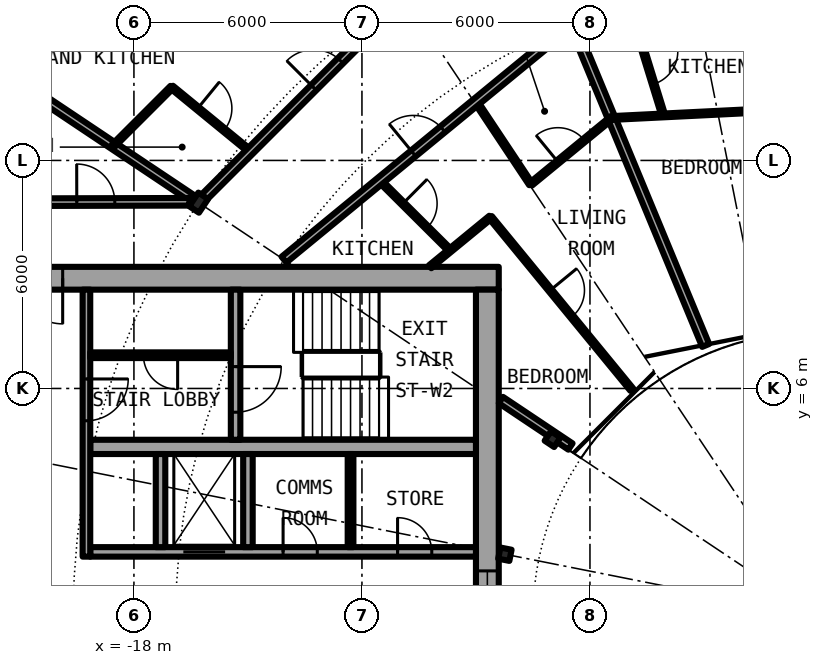
"""IFC4 building model, lengths in metres.
Left out: names, types, materials, properties, quantities, classifications, styles, units other than length and angle.
Written with IfcOpenShell. Run it as: python <this file> out.ifc"""

import sys

from ifc_helpers import new_model, si_unit, direction, frame, frame_2d, origin, origin_2d, place, context, subcontext, project, spatial, rectangle, i_section, extrude, element, fill, save


model = new_model("IFC4")
c1 = context("Model", 3, precision=1e-05, world=origin(), true_north=direction((0.0, 1.0)))
c2 = subcontext(c1, "Body", "Model", "MODEL_VIEW")
j1 = project(units=[si_unit("LENGTHUNIT", "METRE"), si_unit("PLANEANGLEUNIT", "RADIAN")], contexts=[c1])
p1 = place(None, origin())
s1 = spatial("IfcSite", under=j1, at=p1, CompositionType="ELEMENT")
p2 = place(p1, origin())
s2 = spatial("IfcBuilding", under=s1, at=p2, CompositionType="ELEMENT")
p3 = place(p2, frame((0.0, 0.0, 111.65)))
s3 = spatial("IfcBuildingStorey", under=s2, at=p3, CompositionType="ELEMENT", Elevation=111.65)
p4 = place(p3, frame((-16.297, 10.889, 0.0), z_axis=(0.0, 0.0, 1.0), x_axis=(-0.831469612303, 0.55557023302, 0.0)))
e1 = element("IfcColumn", 1, at=p4, inside=s3, PredefinedType="COLUMN", context=c2, shape_type="SweptSolid", body=[
    extrude(i_section(OverallWidth=0.307, OverallDepth=0.432, WebThickness=0.021, FlangeThickness=0.04, FilletRadius=0.027, at=origin_2d()), origin(), (0.0, 0.0, 1.0), 3.05),
])
for number, where, z_axis, x_axis in (
    (2, (-6.984, 4.667, 0.0), (0.0, 0.0, 1.0), (-0.831, 0.556, 0.0)),
    (3, (-8.239, 1.639, 0.0), (0.0, 0.0, 1.0), (-0.981, 0.195, 0.0)),
):
    element("IfcColumn", number, at=place(p3, frame(where, z_axis=z_axis, x_axis=x_axis)), inside=s3, PredefinedType="COLUMN", context=c2, shape_type="SweptSolid", body=[
        extrude(i_section(OverallWidth=0.3, OverallDepth=0.3, WebThickness=0.011, FlangeThickness=0.019, FilletRadius=0.027, at=origin_2d()), origin(), (0.0, 0.0, 1.0), 3.05),
    ])
p5 = place(p3, frame((-8.4, 8.9, 0.0), z_axis=(0.0, 0.0, 1.0), x_axis=(-1.0, 0.0, 0.0)))
e4 = element("IfcWall", 4, at=p5, inside=s3, PredefinedType="SHEAR", context=c2, shape_type="SweptSolid", body=[
    extrude(rectangle(XDim=13.8, YDim=0.6, at=frame_2d((6.9, 0.0))), origin(), (0.0, 0.0, 1.0), 3.05),
])
p6 = place(p5, frame((11.475, 0.0, 0.0)))
e5 = element("IfcOpeningElement", 5, at=p6, cuts=e4, PredefinedType="OPENING", context=c2, shape_type="SweptSolid", body=[
    extrude(rectangle(XDim=1.2, YDim=2.3, at=frame_2d((0.6, 1.15))), frame((0.0, 0.31, 0.0), z_axis=(0.0, -1.0, 0.0), x_axis=(1.0, 0.0, 0.0)), (0.0, 0.0, 1.0), 0.62),
])
p7 = place(p3, frame((-8.7, 8.6, 0.0), z_axis=(0.0, 0.0, 1.0), x_axis=(0.0, -1.0, 0.0)))
e6 = element("IfcWall", 6, at=p7, inside=s3, PredefinedType="SHEAR", context=c2, shape_type="SweptSolid", body=[
    extrude(rectangle(XDim=17.2, YDim=0.6, at=frame_2d((8.6, 0.0))), origin(), (0.0, 0.0, 1.0), 3.05),
])
p8 = place(p7, frame((7.4, 0.0, 0.1)))
e7 = element("IfcOpeningElement", 7, at=p8, cuts=e6, PredefinedType="OPENING", context=c2, shape_type="SweptSolid", body=[
    extrude(rectangle(XDim=2.4, YDim=2.2, at=frame_2d((1.2, 1.1))), frame((0.0, 0.31, 0.0), z_axis=(0.0, -1.0, 0.0), x_axis=(1.0, 0.0, 0.0)), (0.0, 0.0, 1.0), 0.62),
])
p9 = place(p3, frame((-19.15, 1.7, 0.0), z_axis=(0.0, 0.0, 1.0), x_axis=(1.0, 0.0, 0.0)))
e8 = element("IfcWall", 8, at=p9, inside=s3, PredefinedType="SHEAR", context=c2, shape_type="SweptSolid", body=[
    extrude(rectangle(XDim=10.15, YDim=0.25, at=frame_2d((5.075, 0.0))), origin(), (0.0, 0.0, 1.0), 3.05),
])
p10 = place(p9, frame((2.45, 0.0, 0.0)))
e9 = element("IfcOpeningElement", 9, at=p10, cuts=e8, PredefinedType="OPENING", context=c2, shape_type="SweptSolid", body=[
    extrude(rectangle(XDim=1.1, YDim=2.3, at=frame_2d((0.55, 1.15))), frame((0.0, 0.135, 0.0), z_axis=(0.0, -1.0, 0.0), x_axis=(1.0, 0.0, 0.0)), (0.0, 0.0, 1.0), 0.27),
])
p11 = place(p9, frame((8.087, 0.0, 0.0)))
e10 = element("IfcOpeningElement", 10, at=p11, cuts=e8, PredefinedType="OPENING", context=c2, shape_type="SweptSolid", body=[
    extrude(rectangle(XDim=0.9, YDim=2.3, at=frame_2d((0.45, 1.15))), frame((0.0, 0.135, 0.0), z_axis=(0.0, -1.0, 0.0), x_axis=(1.0, 0.0, 0.0)), (0.0, 0.0, 1.0), 0.27),
])
p12 = place(p9, frame((5.075, 0.0, 0.0)))
e11 = element("IfcOpeningElement", 11, at=p12, cuts=e8, PredefinedType="OPENING", context=c2, shape_type="SweptSolid", body=[
    extrude(rectangle(XDim=0.9, YDim=2.3, at=frame_2d((0.45, 1.15))), frame((0.0, 0.135, 0.0), z_axis=(0.0, -1.0, 0.0), x_axis=(1.0, 0.0, 0.0)), (0.0, 0.0, 1.0), 0.27),
])
p13 = place(p3, frame((-9.0, 4.462, 0.0), z_axis=(0.0, 0.0, 1.0), x_axis=(-1.0, 0.0, 0.0)))
e12 = element("IfcWall", 12, at=p13, inside=s3, PredefinedType="SHEAR", context=c2, shape_type="SweptSolid", body=[
    extrude(rectangle(XDim=10.15, YDim=0.375, at=frame_2d((5.075, 0.0))), origin(), (0.0, 0.0, 1.0), 3.05),
])
p14 = place(p3, frame((-15.325, 8.6, 0.0), z_axis=(0.0, 0.0, 1.0), x_axis=(0.0, -1.0, 0.0)))
e13 = element("IfcWall", 13, at=p14, inside=s3, PredefinedType="SHEAR", context=c2, shape_type="SweptSolid", body=[
    extrude(rectangle(XDim=3.95, YDim=0.25, at=frame_2d((1.975, 0.0))), origin(), (0.0, 0.0, 1.0), 3.05),
])
p15 = place(p14, frame((2.025, 0.0, 0.0)))
e14 = element("IfcOpeningElement", 14, at=p15, cuts=e13, PredefinedType="OPENING", context=c2, shape_type="SweptSolid", body=[
    extrude(rectangle(XDim=1.2, YDim=2.3, at=frame_2d((0.6, 1.15))), frame((0.0, 0.135, 0.0), z_axis=(0.0, -1.0, 0.0), x_axis=(1.0, 0.0, 0.0)), (0.0, 0.0, 1.0), 0.27),
])
for number, where, z_axis, x_axis in (
    (15, (-15.0, 1.825, 0.0), (0.0, 0.0, 1.0), (0.0, 1.0, 0.0)),
    (16, (-17.3, 1.825, 0.0), (0.0, 0.0, 1.0), (0.0, 1.0, 0.0)),
):
    element("IfcWall", number, at=place(p3, frame(where, z_axis=z_axis, x_axis=x_axis)), inside=s3, PredefinedType="SOLIDWALL", context=c2, shape_type="SweptSolid", body=[
        extrude(rectangle(XDim=2.45, YDim=0.25, at=frame_2d((1.225, 0.0))), origin(), (0.0, 0.0, 1.0), 2.7),
    ])
p16 = place(p3, frame((-19.25, 8.6, 0.0), z_axis=(0.0, 0.0, 1.0), x_axis=(0.0, -1.0, 0.0)))
e17 = element("IfcWall", 17, at=p16, inside=s3, PredefinedType="SOLIDWALL", context=c2, shape_type="SweptSolid", body=[
    extrude(rectangle(XDim=7.025, YDim=0.2, at=frame_2d((3.513, 0.0))), origin(), (0.0, 0.0, 1.0), 2.7),
])
p17 = place(p16, frame((2.35, 0.0, 0.0)))
e18 = element("IfcOpeningElement", 18, at=p17, cuts=e17, PredefinedType="OPENING", context=c2, shape_type="SweptSolid", body=[
    extrude(rectangle(XDim=1.1, YDim=2.3, at=frame_2d((0.55, 1.15))), frame((0.0, 0.11, 0.0), z_axis=(0.0, -1.0, 0.0), x_axis=(1.0, 0.0, 0.0)), (0.0, 0.0, 1.0), 0.22),
])
p18 = place(p3, frame((-12.3, 1.825, 0.0), z_axis=(0.0, 0.0, 1.0), x_axis=(0.0, 1.0, 0.0)))
e19 = element("IfcWall", 19, at=p18, inside=s3, PredefinedType="PARTITIONING", context=c2, shape_type="SweptSolid", body=[
    extrude(rectangle(XDim=2.45, YDim=0.15, at=frame_2d((1.225, 0.0))), origin(), (0.0, 0.0, 1.0), 2.7),
])
p19 = place(p3, frame((-15.45, 6.875, 0.0), z_axis=(0.0, 0.0, 1.0), x_axis=(-1.0, 0.0, 0.0)))
e20 = element("IfcWall", 20, at=p19, inside=s3, PredefinedType="PARTITIONING", context=c2, shape_type="SweptSolid", body=[
    extrude(rectangle(XDim=3.7, YDim=0.15, at=frame_2d((1.85, 0.0))), origin(), (0.0, 0.0, 1.0), 2.7),
])
p20 = place(p19, frame((1.4, 0.0, 0.0)))
e21 = element("IfcOpeningElement", 21, at=p20, cuts=e20, PredefinedType="OPENING", context=c2, shape_type="SweptSolid", body=[
    extrude(rectangle(XDim=0.9, YDim=2.3, at=frame_2d((0.45, 1.15))), frame((0.0, 0.085, 0.0), z_axis=(0.0, -1.0, 0.0), x_axis=(1.0, 0.0, 0.0)), (0.0, 0.0, 1.0), 0.17),
])
p21 = place(p3, frame((-22.595, 15.098, 0.0), z_axis=(0.0, 0.0, 1.0), x_axis=(0.831406593008, -0.555664536482, 0.0)))
e22 = element("IfcWall", 22, at=p21, inside=s3, PredefinedType="PARTITIONING", context=c2, shape_type="SweptSolid", body=[
    extrude(rectangle(XDim=7.358, YDim=0.2, at=frame_2d((3.679, 0.0))), origin(), (0.0, 0.0, 1.0), 2.7),
])
p22 = place(p3, frame((-17.004, 13.927, 0.0), z_axis=(0.0, 0.0, 1.0), x_axis=(0.77367517848, -0.633582447834, 0.0)))
e23 = element("IfcWall", 23, at=p22, inside=s3, PredefinedType="PARTITIONING", context=c2, shape_type="SweptSolid", body=[
    extrude(rectangle(XDim=2.661, YDim=0.1, at=frame_2d((1.331, 0.0))), origin(), (0.0, 0.0, 1.0), 2.7),
])
p23 = place(p22, frame((0.881, 0.0, 0.0)))
e24 = element("IfcOpeningElement", 24, at=p23, cuts=e23, PredefinedType="OPENING", context=c2, shape_type="SweptSolid", body=[
    extrude(rectangle(XDim=0.9, YDim=2.3, at=frame_2d((0.45, 1.15))), frame((0.0, 0.06, 0.0), z_axis=(0.0, -1.0, 0.0), x_axis=(1.0, 0.0, 0.0)), (0.0, 0.0, 1.0), 0.12),
])
p24 = place(p3, frame((-11.524, 11.464, 0.0), z_axis=(0.0, 0.0, 1.0), x_axis=(0.708796844581, -0.705412668665, 0.0)))
e25 = element("IfcWall", 25, at=p24, inside=s3, PredefinedType="PARTITIONING", context=c2, shape_type="SweptSolid", body=[
    extrude(rectangle(XDim=2.597, YDim=0.1, at=frame_2d((1.299, 0.0))), origin(), (0.0, 0.0, 1.0), 2.7),
])
p25 = place(p24, frame((0.849, 0.0, 0.0)))
e26 = element("IfcOpeningElement", 26, at=p25, cuts=e25, PredefinedType="OPENING", context=c2, shape_type="SweptSolid", body=[
    extrude(rectangle(XDim=0.9, YDim=2.3, at=frame_2d((0.45, 1.15))), frame((0.0, 0.06, 0.0), z_axis=(0.0, -1.0, 0.0), x_axis=(1.0, 0.0, 0.0)), (0.0, 0.0, 1.0), 0.12),
])
p26 = place(p3, frame((-8.996, 13.539, 0.0), z_axis=(0.0, 0.0, 1.0), x_axis=(0.553615197403, -0.83277260594, 0.0)))
e27 = element("IfcWall", 27, at=p26, inside=s3, PredefinedType="PARTITIONING", context=c2, shape_type="SweptSolid", body=[
    extrude(rectangle(XDim=2.597, YDim=0.1, at=frame_2d((1.299, 0.0))), origin(), (0.0, 0.0, 1.0), 2.7),
])
p27 = place(p3, frame((-8.62, 10.504, 0.0), z_axis=(0.0, 0.0, 1.0), x_axis=(0.634358693064, -0.773038840249, 0.0)))
e28 = element("IfcWall", 28, at=p27, inside=s3, PredefinedType="PARTITIONING", context=c2, shape_type="SweptSolid", body=[
    extrude(rectangle(XDim=5.868, YDim=0.1, at=frame_2d((2.934, 0.0))), origin(), (0.0, 0.0, 1.0), 2.7),
])
p28 = place(p27, frame((2.484, 0.0, 0.0)))
e29 = element("IfcOpeningElement", 29, at=p28, cuts=e28, PredefinedType="OPENING", context=c2, shape_type="SweptSolid", body=[
    extrude(rectangle(XDim=0.9, YDim=2.3, at=frame_2d((0.45, 1.15))), frame((0.0, 0.06, 0.0), z_axis=(0.0, -1.0, 0.0), x_axis=(1.0, 0.0, 0.0)), (0.0, 0.0, 1.0), 0.12),
])
p29 = place(p3, frame((-6.468, 15.614, 0.0), z_axis=(0.0, 0.0, 1.0), x_axis=(0.382646942224, -0.923894646378, 0.0)))
e30 = element("IfcWall", 30, at=p29, inside=s3, PredefinedType="PARTITIONING", context=c2, shape_type="SweptSolid", body=[
    extrude(rectangle(XDim=9.181, YDim=0.2, at=frame_2d((4.59, 0.0))), origin(), (0.0, 0.0, 1.0), 2.7),
])
p30 = place(p3, frame((-4.843, 15.693, 0.0), z_axis=(0.0, 0.0, 1.0), x_axis=(0.294961884541, -0.955509019669, 0.0)))
e31 = element("IfcWall", 31, at=p30, inside=s3, PredefinedType="PARTITIONING", context=c2, shape_type="SweptSolid", body=[
    extrude(rectangle(XDim=2.624, YDim=0.1, at=frame_2d((1.312, 0.0))), origin(), (0.0, 0.0, 1.0), 2.7),
])
p31 = place(p30, frame((0.862, 0.0, 0.0)))
e32 = element("IfcOpeningElement", 32, at=p31, cuts=e31, PredefinedType="OPENING", context=c2, shape_type="SweptSolid", body=[
    extrude(rectangle(XDim=0.9, YDim=2.3, at=frame_2d((0.45, 1.15))), frame((0.0, 0.06, 0.0), z_axis=(0.0, -1.0, 0.0), x_axis=(1.0, 0.0, 0.0)), (0.0, 0.0, 1.0), 0.12),
])
p32 = place(p3, frame((-6.513, 4.472, 0.0), z_axis=(0.0, 0.0, 1.0), x_axis=(-0.831333375071, 0.555774072347, 0.0)))
e33 = element("IfcWall", 33, at=p32, inside=s3, PredefinedType="PARTITIONING", context=c2, shape_type="SweptSolid", body=[
    extrude(rectangle(XDim=2.203, YDim=0.2, at=frame_2d((1.101, 0.0))), origin(), (0.0, 0.0, 1.0), 2.7),
])
p33 = place(p3, frame((-21.675, 10.9, 0.0), z_axis=(0.0, 0.0, 1.0), x_axis=(0.999997173357, 0.002377662213, 0.0)))
e34 = element("IfcWall", 34, at=p33, inside=s3, PredefinedType="PARTITIONING", context=c2, shape_type="SweptSolid", body=[
    extrude(rectangle(XDim=5.134, YDim=0.2, at=frame_2d((2.567, 0.0))), origin(), (0.0, 0.0, 1.0), 2.7),
])
p34 = place(p33, frame((2.171, 0.0, 0.0)))
e35 = element("IfcOpeningElement", 35, at=p34, cuts=e34, PredefinedType="OPENING", context=c2, shape_type="SweptSolid", body=[
    extrude(rectangle(XDim=1.0, YDim=2.3, at=frame_2d((0.5, 1.15))), frame((0.0, 0.11, 0.0), z_axis=(0.0, -1.0, 0.0), x_axis=(1.0, 0.0, 0.0)), (0.0, 0.0, 1.0), 0.22),
])
p35 = place(p3, frame((-5.439, 13.116, 0.0), z_axis=(0.0, 0.0, 1.0), x_axis=(0.998772010578, 0.049542616872, 0.0)))
e36 = element("IfcWall", 36, at=p35, inside=s3, PredefinedType="PARTITIONING", context=c2, shape_type="SweptSolid", body=[
    extrude(rectangle(XDim=4.1, YDim=0.1, at=frame_2d((2.05, 0.0))), origin(), (0.0, 0.0, 1.0), 2.7),
])
p36 = place(p3, frame((-10.207, 9.202, 0.0), z_axis=(0.0, 0.0, 1.0), x_axis=(0.772998703631, 0.634407600983, 0.0)))
e37 = element("IfcWall", 37, at=p36, inside=s3, PredefinedType="PARTITIONING", context=c2, shape_type="SweptSolid", body=[
    extrude(rectangle(XDim=2.056, YDim=0.1, at=frame_2d((1.028, 0.0))), origin(), (0.0, 0.0, 1.0), 2.7),
])
p37 = place(p3, frame((-7.556, 11.377, 0.0), z_axis=(0.0, 0.0, 1.0), x_axis=(0.773149312811, 0.634224045665, 0.0)))
e38 = element("IfcWall", 38, at=p37, inside=s3, PredefinedType="PARTITIONING", context=c2, shape_type="SweptSolid", body=[
    extrude(rectangle(XDim=2.749, YDim=0.1, at=frame_2d((1.374, 0.0))), origin(), (0.0, 0.0, 1.0), 2.7),
])
p38 = place(p37, frame((0.922, 0.0, 0.0)))
e39 = element("IfcOpeningElement", 39, at=p38, cuts=e38, PredefinedType="OPENING", context=c2, shape_type="SweptSolid", body=[
    extrude(rectangle(XDim=0.9, YDim=2.3, at=frame_2d((0.45, 1.15))), frame((0.0, 0.06, 0.0), z_axis=(0.0, -1.0, 0.0), x_axis=(1.0, 0.0, 0.0)), (0.0, 0.0, 1.0), 0.12),
])
p39 = place(p3, frame((-14.052, 9.389, 0.0), z_axis=(0.0, 0.0, 1.0), x_axis=(0.77292501819, 0.634497372931, 0.0)))
e40 = element("IfcWall", 40, at=p39, inside=s3, PredefinedType="PARTITIONING", context=c2, shape_type="SweptSolid", body=[
    extrude(rectangle(XDim=9.81, YDim=0.2, at=frame_2d((4.905, 0.0))), origin(), (0.0, 0.0, 1.0), 2.7),
])
p40 = place(p39, frame((4.406, 0.0, 0.0)))
e41 = element("IfcOpeningElement", 41, at=p40, cuts=e40, PredefinedType="OPENING", context=c2, shape_type="SweptSolid", body=[
    extrude(rectangle(XDim=1.0, YDim=2.3, at=frame_2d((0.5, 1.15))), frame((0.0, 0.11, 0.0), z_axis=(0.0, -1.0, 0.0), x_axis=(1.0, 0.0, 0.0)), (0.0, 0.0, 1.0), 0.22),
])
p41 = place(p3, frame((-16.186, 11.0, 0.0), z_axis=(0.0, 0.0, 1.0), x_axis=(0.707106781187, 0.707106781187, 0.0)))
e42 = element("IfcWall", 42, at=p41, inside=s3, PredefinedType="PARTITIONING", context=c2, shape_type="SweptSolid", body=[
    extrude(rectangle(XDim=7.334, YDim=0.2, at=frame_2d((3.667, 0.0))), origin(), (0.0, 0.0, 1.0), 2.39),
])
p42 = place(p41, frame((4.123, 0.0, 0.0)))
e43 = element("IfcOpeningElement", 43, at=p42, cuts=e42, PredefinedType="OPENING", context=c2, shape_type="SweptSolid", body=[
    extrude(rectangle(XDim=1.0, YDim=2.3, at=frame_2d((0.5, 1.15))), frame((0.0, 0.11, 0.0), z_axis=(0.0, -1.0, 0.0), x_axis=(1.0, 0.0, 0.0)), (0.0, 0.0, 1.0), 0.22),
])
p43 = place(p3, frame((-18.542, 12.389, 0.0), z_axis=(0.0, 0.0, 1.0), x_axis=(0.707106781187, 0.707106781187, 0.0)))
e44 = element("IfcWall", 44, at=p43, inside=s3, PredefinedType="PARTITIONING", context=c2, shape_type="SweptSolid", body=[
    extrude(rectangle(XDim=2.175, YDim=0.1, at=frame_2d((1.088, 0.0))), origin(), (0.0, 0.0, 1.0), 2.7),
])
p44 = place(p10, origin())
e45 = element("IfcDoor", 45, at=p44, inside=s3, OperationType="DOUBLE_DOOR_SLIDING", PredefinedType="DOOR", context=c2, shape_type="SweptSolid", body=[
    extrude(rectangle(XDim=1.1, YDim=2.3, at=frame_2d((0.55, 1.15))), frame((0.0, 0.025, 0.0), z_axis=(0.0, -1.0, 0.0), x_axis=(1.0, 0.0, 0.0)), (0.0, 0.0, 1.0), 0.05),
])
fill(e9, e45)
p45 = place(p11, origin())
e46 = element("IfcDoor", 46, at=p45, inside=s3, OperationType="SINGLE_SWING_LEFT", PredefinedType="DOOR", context=c2, shape_type="SweptSolid", body=[
    extrude(rectangle(XDim=0.9, YDim=2.3, at=frame_2d((0.45, 1.15))), frame((0.0, 0.025, 0.0), z_axis=(0.0, -1.0, 0.0), x_axis=(1.0, 0.0, 0.0)), (0.0, 0.0, 1.0), 0.05),
])
fill(e10, e46)
p46 = place(p12, origin())
e47 = element("IfcDoor", 47, at=p46, inside=s3, OperationType="SINGLE_SWING_LEFT", PredefinedType="DOOR", context=c2, shape_type="SweptSolid", body=[
    extrude(rectangle(XDim=0.9, YDim=2.3, at=frame_2d((0.45, 1.15))), frame((0.0, 0.025, 0.0), z_axis=(0.0, -1.0, 0.0), x_axis=(1.0, 0.0, 0.0)), (0.0, 0.0, 1.0), 0.05),
])
fill(e11, e47)
p47 = place(p20, origin())
e48 = element("IfcDoor", 48, at=p47, inside=s3, OperationType="SINGLE_SWING_LEFT", PredefinedType="DOOR", context=c2, shape_type="SweptSolid", body=[
    extrude(rectangle(XDim=0.9, YDim=2.3, at=frame_2d((0.45, 1.15))), frame((0.0, 0.025, 0.0), z_axis=(0.0, -1.0, 0.0), x_axis=(1.0, 0.0, 0.0)), (0.0, 0.0, 1.0), 0.05),
])
fill(e21, e48)
p48 = place(p15, origin())
e49 = element("IfcDoor", 49, at=p48, inside=s3, OperationType="SINGLE_SWING_LEFT", PredefinedType="DOOR", context=c2, shape_type="SweptSolid", body=[
    extrude(rectangle(XDim=1.2, YDim=2.3, at=frame_2d((0.6, 1.15))), frame((0.0, 0.025, 0.0), z_axis=(0.0, -1.0, 0.0), x_axis=(1.0, 0.0, 0.0)), (0.0, 0.0, 1.0), 0.05),
])
fill(e14, e49)
p49 = place(p17, origin())
e50 = element("IfcDoor", 50, at=p49, inside=s3, OperationType="SINGLE_SWING_RIGHT", PredefinedType="DOOR", context=c2, shape_type="SweptSolid", body=[
    extrude(rectangle(XDim=1.1, YDim=2.3, at=frame_2d((0.55, 1.15))), frame((0.0, 0.025, 0.0), z_axis=(0.0, -1.0, 0.0), x_axis=(1.0, 0.0, 0.0)), (0.0, 0.0, 1.0), 0.05),
])
fill(e18, e50)
p50 = place(p6, origin())
e51 = element("IfcDoor", 51, at=p50, inside=s3, OperationType="SINGLE_SWING_LEFT", PredefinedType="DOOR", context=c2, shape_type="SweptSolid", body=[
    extrude(rectangle(XDim=1.2, YDim=2.3, at=frame_2d((0.6, 1.15))), frame((0.0, 0.025, 0.0), z_axis=(0.0, -1.0, 0.0), x_axis=(1.0, 0.0, 0.0)), (0.0, 0.0, 1.0), 0.05),
])
fill(e5, e51)
p51 = place(p8, origin())
e52 = element("IfcWindow", 52, at=p51, inside=s3, PartitioningType="SINGLE_PANEL", PredefinedType="WINDOW", context=c2, shape_type="SweptSolid", body=[
    extrude(rectangle(XDim=2.4, YDim=2.2, at=frame_2d((1.2, 1.1))), frame((0.0, 0.03, 0.0), z_axis=(0.0, -1.0, 0.0), x_axis=(1.0, 0.0, 0.0)), (0.0, 0.0, 1.0), 0.06),
])
fill(e7, e52)
p52 = place(p42, origin())
e53 = element("IfcDoor", 53, at=p52, inside=s3, OperationType="SINGLE_SWING_RIGHT", PredefinedType="DOOR", context=c2, shape_type="SweptSolid", body=[
    extrude(rectangle(XDim=1.0, YDim=2.3, at=frame_2d((0.5, 1.15))), frame((0.0, 0.025, 0.0), z_axis=(0.0, -1.0, 0.0), x_axis=(1.0, 0.0, 0.0)), (0.0, 0.0, 1.0), 0.05),
])
fill(e43, e53)
p53 = place(p23, origin())
e54 = element("IfcDoor", 54, at=p53, inside=s3, OperationType="SINGLE_SWING_RIGHT", PredefinedType="DOOR", context=c2, shape_type="SweptSolid", body=[
    extrude(rectangle(XDim=0.9, YDim=2.3, at=frame_2d((0.45, 1.15))), frame((0.0, 0.025, 0.0), z_axis=(0.0, -1.0, 0.0), x_axis=(1.0, 0.0, 0.0)), (0.0, 0.0, 1.0), 0.05),
])
fill(e24, e54)
p54 = place(p31, origin())
e55 = element("IfcDoor", 55, at=p54, inside=s3, OperationType="SINGLE_SWING_RIGHT", PredefinedType="DOOR", context=c2, shape_type="SweptSolid", body=[
    extrude(rectangle(XDim=0.9, YDim=2.3, at=frame_2d((0.45, 1.15))), frame((0.0, 0.025, 0.0), z_axis=(0.0, -1.0, 0.0), x_axis=(1.0, 0.0, 0.0)), (0.0, 0.0, 1.0), 0.05),
])
fill(e32, e55)
p55 = place(p40, origin())
e56 = element("IfcDoor", 56, at=p55, inside=s3, OperationType="SINGLE_SWING_RIGHT", PredefinedType="DOOR", context=c2, shape_type="SweptSolid", body=[
    extrude(rectangle(XDim=1.0, YDim=2.3, at=frame_2d((0.5, 1.15))), frame((0.0, 0.025, 0.0), z_axis=(0.0, -1.0, 0.0), x_axis=(1.0, 0.0, 0.0)), (0.0, 0.0, 1.0), 0.05),
])
fill(e41, e56)
p56 = place(p38, origin())
e57 = element("IfcDoor", 57, at=p56, inside=s3, OperationType="SINGLE_SWING_LEFT", PredefinedType="DOOR", context=c2, shape_type="SweptSolid", body=[
    extrude(rectangle(XDim=0.9, YDim=2.3, at=frame_2d((0.45, 1.15))), frame((0.0, 0.025, 0.0), z_axis=(0.0, -1.0, 0.0), x_axis=(1.0, 0.0, 0.0)), (0.0, 0.0, 1.0), 0.05),
])
fill(e39, e57)
p57 = place(p25, origin())
e58 = element("IfcDoor", 58, at=p57, inside=s3, OperationType="SINGLE_SWING_RIGHT", PredefinedType="DOOR", context=c2, shape_type="SweptSolid", body=[
    extrude(rectangle(XDim=0.9, YDim=2.3, at=frame_2d((0.45, 1.15))), frame((0.0, 0.025, 0.0), z_axis=(0.0, -1.0, 0.0), x_axis=(1.0, 0.0, 0.0)), (0.0, 0.0, 1.0), 0.05),
])
fill(e26, e58)
p58 = place(p28, origin())
e59 = element("IfcDoor", 59, at=p58, inside=s3, OperationType="SINGLE_SWING_RIGHT", PredefinedType="DOOR", context=c2, shape_type="SweptSolid", body=[
    extrude(rectangle(XDim=0.9, YDim=2.3, at=frame_2d((0.45, 1.15))), frame((0.0, 0.025, 0.0), z_axis=(0.0, -1.0, 0.0), x_axis=(1.0, 0.0, 0.0)), (0.0, 0.0, 1.0), 0.05),
])
fill(e29, e59)
p59 = place(p34, origin())
e60 = element("IfcDoor", 60, at=p59, inside=s3, OperationType="SINGLE_SWING_RIGHT", PredefinedType="DOOR", context=c2, shape_type="SweptSolid", body=[
    extrude(rectangle(XDim=1.0, YDim=2.3, at=frame_2d((0.5, 1.15))), frame((0.0, 0.025, 0.0), z_axis=(0.0, -1.0, 0.0), x_axis=(1.0, 0.0, 0.0)), (0.0, 0.0, 1.0), 0.05),
])
fill(e35, e60)
save(model, sys.argv[1])
